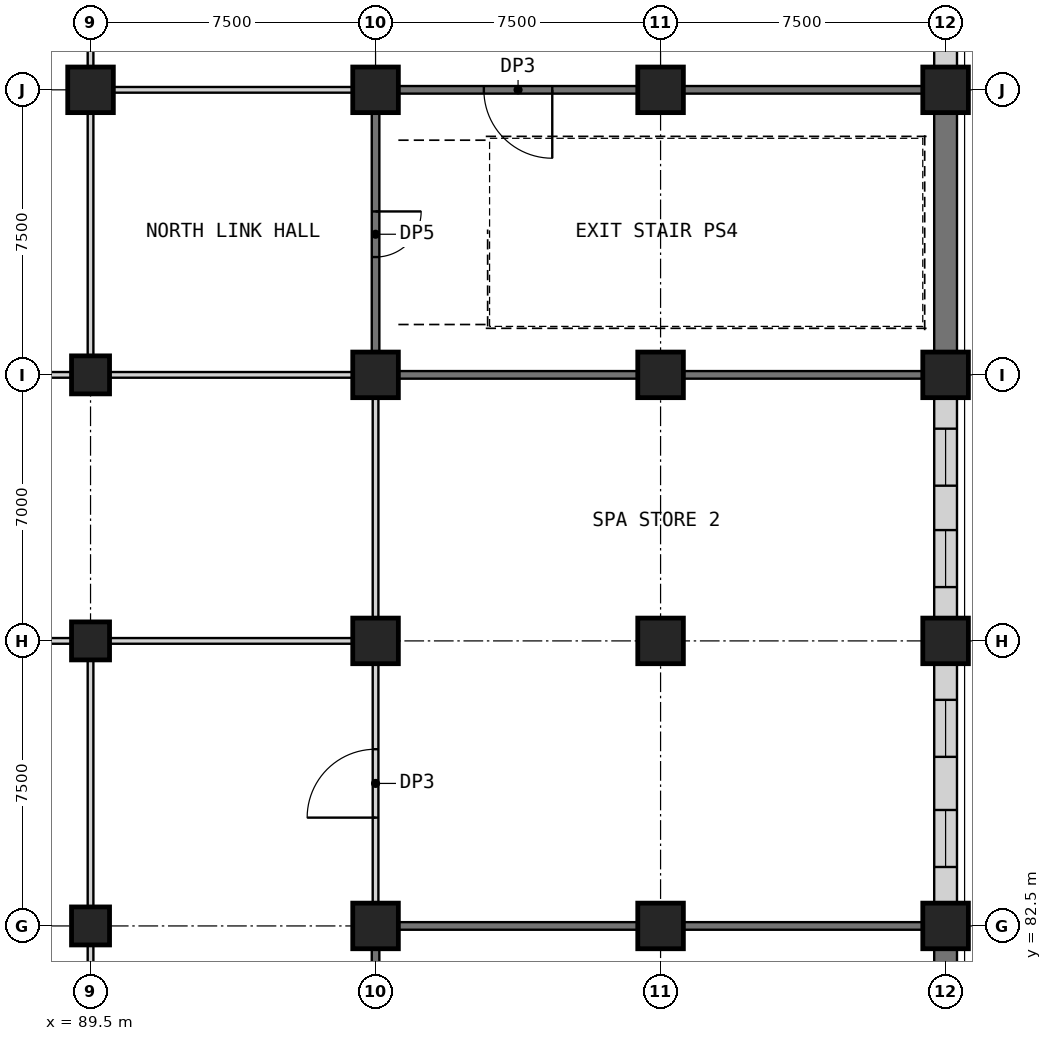
"""IFC4 building model, lengths in metres.
Left out: names, types, materials, properties, quantities, classifications, styles, units other than length and angle.
Written with IfcOpenShell. Run it as: python <this file> out.ifc"""

import sys

from ifc_helpers import new_model, si_unit, direction, frame, frame_2d, origin, origin_2d, place, context, subcontext, project, spatial, rectangle, extrude, element, fill, save


model = new_model("IFC4")
c1 = context("Model", 3, precision=1e-05, world=origin(), true_north=direction((0.0, 1.0)))
c2 = subcontext(c1, "Body", "Model", "MODEL_VIEW")
j1 = project(units=[si_unit("LENGTHUNIT", "METRE"), si_unit("PLANEANGLEUNIT", "RADIAN")], contexts=[c1])
p1 = place(None, origin())
s1 = spatial("IfcSite", under=j1, at=p1, CompositionType="ELEMENT")
p2 = place(p1, origin())
s2 = spatial("IfcBuilding", under=s1, at=p2, CompositionType="ELEMENT")
p3 = place(p2, frame((0.0, 0.0, 29.0)))
s3 = spatial("IfcBuildingStorey", under=s2, at=p3, CompositionType="ELEMENT", Elevation=29.0)
for number, where, z_axis, x_axis in (
    (1, (89.5, 82.5, 0.0), (0.0, 0.0, 1.0), (1.0, 0.0, 0.0)),
    (2, (89.5, 90.0, 0.0), (0.0, 0.0, 1.0), (1.0, 0.0, 0.0)),
    (3, (89.5, 97.0, 0.0), (0.0, 0.0, 1.0), (1.0, 0.0, 0.0)),
):
    element("IfcColumn", number, at=place(p3, frame(where, z_axis=z_axis, x_axis=x_axis)), inside=s3, PredefinedType="COLUMN", context=c2, shape_type="SweptSolid", body=[
        extrude(rectangle(XDim=1.0, YDim=1.0, at=origin_2d()), origin(), (0.0, 0.0, 1.0), 5.0),
    ])
for number, where, z_axis, x_axis in (
    (4, (89.5, 104.5, 0.0), (0.0, 0.0, 1.0), (1.0, 0.0, 0.0)),
    (5, (97.0, 82.5, 0.0), (0.0, 0.0, 1.0), (1.0, 0.0, 0.0)),
    (6, (97.0, 90.0, 0.0), (0.0, 0.0, 1.0), (1.0, 0.0, 0.0)),
    (7, (97.0, 97.0, 0.0), (0.0, 0.0, 1.0), (1.0, 0.0, 0.0)),
    (8, (97.0, 104.5, 0.0), (0.0, 0.0, 1.0), (1.0, 0.0, 0.0)),
    (9, (104.5, 82.5, 0.0), (0.0, 0.0, 1.0), (1.0, 0.0, 0.0)),
    (10, (104.5, 90.0, 0.0), (0.0, 0.0, 1.0), (1.0, 0.0, 0.0)),
    (11, (104.5, 97.0, 0.0), (0.0, 0.0, 1.0), (1.0, 0.0, 0.0)),
    (12, (104.5, 104.5, 0.0), (0.0, 0.0, 1.0), (1.0, 0.0, 0.0)),
    (13, (112.0, 82.5, 0.0), (0.0, 0.0, 1.0), (1.0, 0.0, 0.0)),
    (14, (112.0, 90.0, 0.0), (0.0, 0.0, 1.0), (1.0, 0.0, 0.0)),
    (15, (112.0, 97.0, 0.0), (0.0, 0.0, 1.0), (1.0, 0.0, 0.0)),
    (16, (112.0, 104.5, 0.0), (0.0, 0.0, 1.0), (1.0, 0.0, 0.0)),
):
    element("IfcColumn", number, at=place(p3, frame(where, z_axis=z_axis, x_axis=x_axis)), inside=s3, PredefinedType="COLUMN", context=c2, shape_type="SweptSolid", body=[
        extrude(rectangle(XDim=1.2, YDim=1.2, at=origin_2d()), origin(), (0.0, 0.0, 1.0), 5.0),
    ])
p4 = place(p3, frame((89.0, 97.0, 0.0), z_axis=(0.0, 0.0, 1.0), x_axis=(-1.0, 0.0, 0.0)))
e17 = element("IfcWall", 17, at=p4, inside=s3, PredefinedType="PARTITIONING", context=c2, shape_type="SweptSolid", body=[
    extrude(rectangle(XDim=3.175, YDim=0.15, at=frame_2d((1.587, 0.0))), origin(), (0.0, 0.0, 1.0), 4.7),
])
p5 = place(p4, frame((0.925, 0.0, 0.0)))
e18 = element("IfcOpeningElement", 18, at=p5, cuts=e17, PredefinedType="OPENING", context=c2, shape_type="SweptSolid", body=[
    extrude(rectangle(XDim=1.0, YDim=2.1, at=frame_2d((0.5, 1.05))), frame((0.0, 0.085, 0.0), z_axis=(0.0, -1.0, 0.0), x_axis=(1.0, 0.0, 0.0)), (0.0, 0.0, 1.0), 0.17),
])
p6 = place(p3, frame((90.0, 97.0, 0.0), z_axis=(0.0, 0.0, 1.0), x_axis=(1.0, 0.0, 0.0)))
e19 = element("IfcWall", 19, at=p6, inside=s3, PredefinedType="PARTITIONING", context=c2, shape_type="SweptSolid", body=[
    extrude(rectangle(XDim=6.4, YDim=0.15, at=frame_2d((3.2, 0.0))), origin(), (0.0, 0.0, 1.0), 4.7),
])
for number, where, z_axis, x_axis in (
    (20, (97.6, 97.0, 0.0), (0.0, 0.0, 1.0), (1.0, 0.0, 0.0)),
    (21, (105.1, 97.0, 0.0), (0.0, 0.0, 1.0), (1.0, 0.0, 0.0)),
    (22, (97.6, 82.5, 0.0), (0.0, 0.0, 1.0), (1.0, 0.0, 0.0)),
    (23, (105.1, 82.5, 0.0), (0.0, 0.0, 1.0), (1.0, 0.0, 0.0)),
):
    element("IfcWall", number, at=place(p3, frame(where, z_axis=z_axis, x_axis=x_axis)), inside=s3, PredefinedType="SHEAR", context=c2, shape_type="SweptSolid", body=[
        extrude(rectangle(XDim=6.3, YDim=0.2, at=frame_2d((3.15, 0.0))), origin(), (0.0, 0.0, 1.0), 4.7),
    ])
p7 = place(p3, frame((90.1, 104.5, 0.0), z_axis=(0.0, 0.0, 1.0), x_axis=(1.0, 0.0, 0.0)))
e24 = element("IfcWall", 24, at=p7, inside=s3, PredefinedType="PARTITIONING", context=c2, shape_type="SweptSolid", body=[
    extrude(rectangle(XDim=6.3, YDim=0.15, at=frame_2d((3.15, 0.0))), origin(), (0.0, 0.0, 1.0), 4.7),
])
p8 = place(p3, frame((103.9, 104.5, 0.0), z_axis=(0.0, 0.0, 1.0), x_axis=(-1.0, 0.0, 0.0)))
e25 = element("IfcWall", 25, at=p8, inside=s3, PredefinedType="SHEAR", context=c2, shape_type="SweptSolid", body=[
    extrude(rectangle(XDim=6.3, YDim=0.2, at=frame_2d((3.15, 0.0))), origin(), (0.0, 0.0, 1.0), 4.7),
])
p9 = place(p8, frame((2.25, 0.0, 0.0)))
e26 = element("IfcOpeningElement", 26, at=p9, cuts=e25, PredefinedType="OPENING", context=c2, shape_type="SweptSolid", body=[
    extrude(rectangle(XDim=1.8, YDim=2.4, at=frame_2d((0.9, 1.2))), frame((0.0, 0.11, 0.0), z_axis=(0.0, -1.0, 0.0), x_axis=(1.0, 0.0, 0.0)), (0.0, 0.0, 1.0), 0.22),
])
p10 = place(p3, frame((105.1, 104.5, 0.0), z_axis=(0.0, 0.0, 1.0), x_axis=(1.0, 0.0, 0.0)))
e27 = element("IfcWall", 27, at=p10, inside=s3, PredefinedType="SHEAR", context=c2, shape_type="SweptSolid", body=[
    extrude(rectangle(XDim=6.3, YDim=0.2, at=frame_2d((3.15, 0.0))), origin(), (0.0, 0.0, 1.0), 4.7),
])
for number, where, z_axis, x_axis in (
    (28, (82.6, 90.0, 0.0), (0.0, 0.0, 1.0), (1.0, 0.0, 0.0)),
    (29, (90.0, 90.0, 0.0), (0.0, 0.0, 1.0), (1.0, 0.0, 0.0)),
):
    element("IfcWall", number, at=place(p3, frame(where, z_axis=z_axis, x_axis=x_axis)), inside=s3, PredefinedType="PARTITIONING", context=c2, shape_type="SweptSolid", body=[
        extrude(rectangle(XDim=6.4, YDim=0.15, at=frame_2d((3.2, 0.0))), origin(), (0.0, 0.0, 1.0), 4.7),
    ])
p11 = place(p3, frame((97.0, 81.9, 0.0), z_axis=(0.0, 0.0, 1.0), x_axis=(0.0, -1.0, 0.0)))
e30 = element("IfcWall", 30, at=p11, inside=s3, PredefinedType="SHEAR", context=c2, shape_type="SweptSolid", body=[
    extrude(rectangle(XDim=6.3, YDim=0.2, at=frame_2d((3.15, 0.0))), origin(), (0.0, 0.0, 1.0), 4.7),
])
p12 = place(p11, frame((2.6, 0.0, 0.0)))
e31 = element("IfcOpeningElement", 31, at=p12, cuts=e30, PredefinedType="OPENING", context=c2, shape_type="SweptSolid", body=[
    extrude(rectangle(XDim=1.2, YDim=2.1, at=frame_2d((0.6, 1.05))), frame((0.0, 0.11, 0.0), z_axis=(0.0, -1.0, 0.0), x_axis=(1.0, 0.0, 0.0)), (0.0, 0.0, 1.0), 0.22),
])
p13 = place(p3, frame((97.0, 83.1, 0.0), z_axis=(0.0, 0.0, 1.0), x_axis=(0.0, 1.0, 0.0)))
e32 = element("IfcWall", 32, at=p13, inside=s3, PredefinedType="PARTITIONING", context=c2, shape_type="SweptSolid", body=[
    extrude(rectangle(XDim=6.3, YDim=0.15, at=frame_2d((3.15, 0.0))), origin(), (0.0, 0.0, 1.0), 4.7),
])
p14 = place(p13, frame((2.25, 0.0, 0.0)))
e33 = element("IfcOpeningElement", 33, at=p14, cuts=e32, PredefinedType="OPENING", context=c2, shape_type="SweptSolid", body=[
    extrude(rectangle(XDim=1.8, YDim=2.4, at=frame_2d((0.9, 1.2))), frame((0.0, 0.085, 0.0), z_axis=(0.0, -1.0, 0.0), x_axis=(1.0, 0.0, 0.0)), (0.0, 0.0, 1.0), 0.17),
])
p15 = place(p3, frame((97.0, 90.6, 0.0), z_axis=(0.0, 0.0, 1.0), x_axis=(0.0, 1.0, 0.0)))
e34 = element("IfcWall", 34, at=p15, inside=s3, PredefinedType="PARTITIONING", context=c2, shape_type="SweptSolid", body=[
    extrude(rectangle(XDim=5.8, YDim=0.15, at=frame_2d((2.9, 0.0))), origin(), (0.0, 0.0, 1.0), 4.7),
])
p16 = place(p3, frame((97.0, 103.9, 0.0), z_axis=(0.0, 0.0, 1.0), x_axis=(0.0, -1.0, 0.0)))
e35 = element("IfcWall", 35, at=p16, inside=s3, PredefinedType="SHEAR", context=c2, shape_type="SweptSolid", body=[
    extrude(rectangle(XDim=6.3, YDim=0.2, at=frame_2d((3.15, 0.0))), origin(), (0.0, 0.0, 1.0), 4.7),
])
p17 = place(p16, frame((2.6, 0.0, 0.0)))
e36 = element("IfcOpeningElement", 36, at=p17, cuts=e35, PredefinedType="OPENING", context=c2, shape_type="SweptSolid", body=[
    extrude(rectangle(XDim=1.2, YDim=2.1, at=frame_2d((0.6, 1.05))), frame((0.0, 0.11, 0.0), z_axis=(0.0, -1.0, 0.0), x_axis=(1.0, 0.0, 0.0)), (0.0, 0.0, 1.0), 0.22),
])
p18 = place(p3, frame((112.0, 75.6, 0.0), z_axis=(0.0, 0.0, 1.0), x_axis=(0.0, 1.0, 0.0)))
e37 = element("IfcWall", 37, at=p18, inside=s3, PredefinedType="PARTITIONING", context=c2, shape_type="SweptSolid", body=[
    extrude(rectangle(XDim=6.3, YDim=0.6, at=frame_2d((3.15, 0.0))), origin(), (0.0, 0.0, 1.0), 4.7),
])
p19 = place(p3, frame((112.0, 83.1, 0.0), z_axis=(0.0, 0.0, 1.0), x_axis=(0.0, 1.0, 0.0)))
e38 = element("IfcWall", 38, at=p19, inside=s3, PredefinedType="PARTITIONING", context=c2, shape_type="SweptSolid", body=[
    extrude(rectangle(XDim=6.3, YDim=0.6, at=frame_2d((3.15, 0.0))), origin(), (0.0, 0.0, 1.0), 4.7),
])
p20 = place(p19, frame((0.951, 0.0, 0.9)))
e39 = element("IfcOpeningElement", 39, at=p20, cuts=e38, PredefinedType="OPENING", context=c2, shape_type="SweptSolid", body=[
    extrude(rectangle(XDim=1.5, YDim=2.8, at=frame_2d((0.75, 1.4))), frame((0.0, 0.31, 0.0), z_axis=(0.0, -1.0, 0.0), x_axis=(1.0, 0.0, 0.0)), (0.0, 0.0, 1.0), 0.62),
])
p21 = place(p19, frame((3.849, 0.0, 0.9)))
e40 = element("IfcOpeningElement", 40, at=p21, cuts=e38, PredefinedType="OPENING", context=c2, shape_type="SweptSolid", body=[
    extrude(rectangle(XDim=1.5, YDim=2.8, at=frame_2d((0.75, 1.4))), frame((0.0, 0.31, 0.0), z_axis=(0.0, -1.0, 0.0), x_axis=(1.0, 0.0, 0.0)), (0.0, 0.0, 1.0), 0.62),
])
p22 = place(p3, frame((112.0, 90.6, 0.0), z_axis=(0.0, 0.0, 1.0), x_axis=(0.0, 1.0, 0.0)))
e41 = element("IfcWall", 41, at=p22, inside=s3, PredefinedType="PARTITIONING", context=c2, shape_type="SweptSolid", body=[
    extrude(rectangle(XDim=5.8, YDim=0.6, at=frame_2d((2.9, 0.0))), origin(), (0.0, 0.0, 1.0), 4.7),
])
p23 = place(p22, frame((0.816, 0.0, 0.9)))
e42 = element("IfcOpeningElement", 42, at=p23, cuts=e41, PredefinedType="OPENING", context=c2, shape_type="SweptSolid", body=[
    extrude(rectangle(XDim=1.5, YDim=2.8, at=frame_2d((0.75, 1.4))), frame((0.0, 0.31, 0.0), z_axis=(0.0, -1.0, 0.0), x_axis=(1.0, 0.0, 0.0)), (0.0, 0.0, 1.0), 0.62),
])
p24 = place(p22, frame((3.484, 0.0, 0.9)))
e43 = element("IfcOpeningElement", 43, at=p24, cuts=e41, PredefinedType="OPENING", context=c2, shape_type="SweptSolid", body=[
    extrude(rectangle(XDim=1.5, YDim=2.8, at=frame_2d((0.75, 1.4))), frame((0.0, 0.31, 0.0), z_axis=(0.0, -1.0, 0.0), x_axis=(1.0, 0.0, 0.0)), (0.0, 0.0, 1.0), 0.62),
])
p25 = place(p3, frame((112.0, 97.6, 0.0), z_axis=(0.0, 0.0, 1.0), x_axis=(0.0, 1.0, 0.0)))
e44 = element("IfcWall", 44, at=p25, inside=s3, PredefinedType="PARTITIONING", context=c2, shape_type="SweptSolid", body=[
    extrude(rectangle(XDim=6.3, YDim=0.6, at=frame_2d((3.15, 0.0))), origin(), (0.0, 0.0, 1.0), 4.7),
])
p26 = place(p3, frame((112.0, 105.1, 0.0), z_axis=(0.0, 0.0, 1.0), x_axis=(0.0, 1.0, 0.0)))
e45 = element("IfcWall", 45, at=p26, inside=s3, PredefinedType="PARTITIONING", context=c2, shape_type="SweptSolid", body=[
    extrude(rectangle(XDim=6.3, YDim=0.6, at=frame_2d((3.15, 0.0))), origin(), (0.0, 0.0, 1.0), 4.7),
])
p27 = place(p26, frame((0.951, 0.0, 0.9)))
e46 = element("IfcOpeningElement", 46, at=p27, cuts=e45, PredefinedType="OPENING", context=c2, shape_type="SweptSolid", body=[
    extrude(rectangle(XDim=1.5, YDim=2.8, at=frame_2d((0.75, 1.4))), frame((0.0, 0.31, 0.0), z_axis=(0.0, -1.0, 0.0), x_axis=(1.0, 0.0, 0.0)), (0.0, 0.0, 1.0), 0.62),
])
p28 = place(p26, frame((3.849, 0.0, 0.9)))
e47 = element("IfcOpeningElement", 47, at=p28, cuts=e45, PredefinedType="OPENING", context=c2, shape_type="SweptSolid", body=[
    extrude(rectangle(XDim=1.5, YDim=2.8, at=frame_2d((0.75, 1.4))), frame((0.0, 0.31, 0.0), z_axis=(0.0, -1.0, 0.0), x_axis=(1.0, 0.0, 0.0)), (0.0, 0.0, 1.0), 0.62),
])
for number, where, z_axis, x_axis in (
    (48, (89.5, 75.5, 0.0), (0.0, 0.0, 1.0), (0.0, 1.0, 0.0)),
    (49, (89.5, 83.0, 0.0), (0.0, 0.0, 1.0), (0.0, 1.0, 0.0)),
):
    element("IfcWall", number, at=place(p3, frame(where, z_axis=z_axis, x_axis=x_axis)), inside=s3, PredefinedType="PARTITIONING", context=c2, shape_type="SweptSolid", body=[
        extrude(rectangle(XDim=6.5, YDim=0.15, at=frame_2d((3.25, 0.0))), origin(), (0.0, 0.0, 1.0), 4.25),
    ])
p29 = place(p3, frame((89.5, 97.5, 0.0), z_axis=(0.0, 0.0, 1.0), x_axis=(0.0, 1.0, 0.0)))
e50 = element("IfcWall", 50, at=p29, inside=s3, PredefinedType="PARTITIONING", context=c2, shape_type="SweptSolid", body=[
    extrude(rectangle(XDim=6.4, YDim=0.15, at=frame_2d((3.2, 0.0))), origin(), (0.0, 0.0, 1.0), 4.7),
])
p30 = place(p3, frame((89.5, 105.1, 0.0), z_axis=(0.0, 0.0, 1.0), x_axis=(0.0, 1.0, 0.0)))
e51 = element("IfcWall", 51, at=p30, inside=s3, PredefinedType="PARTITIONING", context=c2, shape_type="SweptSolid", body=[
    extrude(rectangle(XDim=6.3, YDim=0.15, at=frame_2d((3.15, 0.0))), origin(), (0.0, 0.0, 1.0), 4.7),
])
p31 = place(p9, origin())
e52 = element("IfcDoor", 52, at=p31, inside=s3, OperationType="SINGLE_SWING_LEFT", PredefinedType="DOOR", context=c2, shape_type="SweptSolid", body=[
    extrude(rectangle(XDim=1.8, YDim=2.4, at=frame_2d((0.9, 1.2))), frame((0.0, 0.025, 0.0), z_axis=(0.0, -1.0, 0.0), x_axis=(1.0, 0.0, 0.0)), (0.0, 0.0, 1.0), 0.05),
])
fill(e26, e52)
p32 = place(p14, origin())
e53 = element("IfcDoor", 53, at=p32, inside=s3, OperationType="SINGLE_SWING_LEFT", PredefinedType="DOOR", context=c2, shape_type="SweptSolid", body=[
    extrude(rectangle(XDim=1.8, YDim=2.4, at=frame_2d((0.9, 1.2))), frame((0.0, 0.025, 0.0), z_axis=(0.0, -1.0, 0.0), x_axis=(1.0, 0.0, 0.0)), (0.0, 0.0, 1.0), 0.05),
])
fill(e33, e53)
p33 = place(p17, origin())
e54 = element("IfcDoor", 54, at=p33, inside=s3, OperationType="SINGLE_SWING_LEFT", PredefinedType="DOOR", context=c2, shape_type="SweptSolid", body=[
    extrude(rectangle(XDim=1.2, YDim=2.1, at=frame_2d((0.6, 1.05))), frame((0.0, 0.025, 0.0), z_axis=(0.0, -1.0, 0.0), x_axis=(1.0, 0.0, 0.0)), (0.0, 0.0, 1.0), 0.05),
])
fill(e36, e54)
p34 = place(p20, origin())
e55 = element("IfcWindow", 55, at=p34, inside=s3, PartitioningType="SINGLE_PANEL", PredefinedType="WINDOW", context=c2, shape_type="SweptSolid", body=[
    extrude(rectangle(XDim=1.5, YDim=2.8, at=frame_2d((0.75, 1.4))), frame((0.0, 0.03, 0.0), z_axis=(0.0, -1.0, 0.0), x_axis=(1.0, 0.0, 0.0)), (0.0, 0.0, 1.0), 0.06),
])
fill(e39, e55)
p35 = place(p21, origin())
e56 = element("IfcWindow", 56, at=p35, inside=s3, PartitioningType="SINGLE_PANEL", PredefinedType="WINDOW", context=c2, shape_type="SweptSolid", body=[
    extrude(rectangle(XDim=1.5, YDim=2.8, at=frame_2d((0.75, 1.4))), frame((0.0, 0.03, 0.0), z_axis=(0.0, -1.0, 0.0), x_axis=(1.0, 0.0, 0.0)), (0.0, 0.0, 1.0), 0.06),
])
fill(e40, e56)
p36 = place(p23, origin())
e57 = element("IfcWindow", 57, at=p36, inside=s3, PartitioningType="SINGLE_PANEL", PredefinedType="WINDOW", context=c2, shape_type="SweptSolid", body=[
    extrude(rectangle(XDim=1.5, YDim=2.8, at=frame_2d((0.75, 1.4))), frame((0.0, 0.03, 0.0), z_axis=(0.0, -1.0, 0.0), x_axis=(1.0, 0.0, 0.0)), (0.0, 0.0, 1.0), 0.06),
])
fill(e42, e57)
p37 = place(p24, origin())
e58 = element("IfcWindow", 58, at=p37, inside=s3, PartitioningType="SINGLE_PANEL", PredefinedType="WINDOW", context=c2, shape_type="SweptSolid", body=[
    extrude(rectangle(XDim=1.5, YDim=2.8, at=frame_2d((0.75, 1.4))), frame((0.0, 0.03, 0.0), z_axis=(0.0, -1.0, 0.0), x_axis=(1.0, 0.0, 0.0)), (0.0, 0.0, 1.0), 0.06),
])
fill(e43, e58)
save(model, sys.argv[1])
